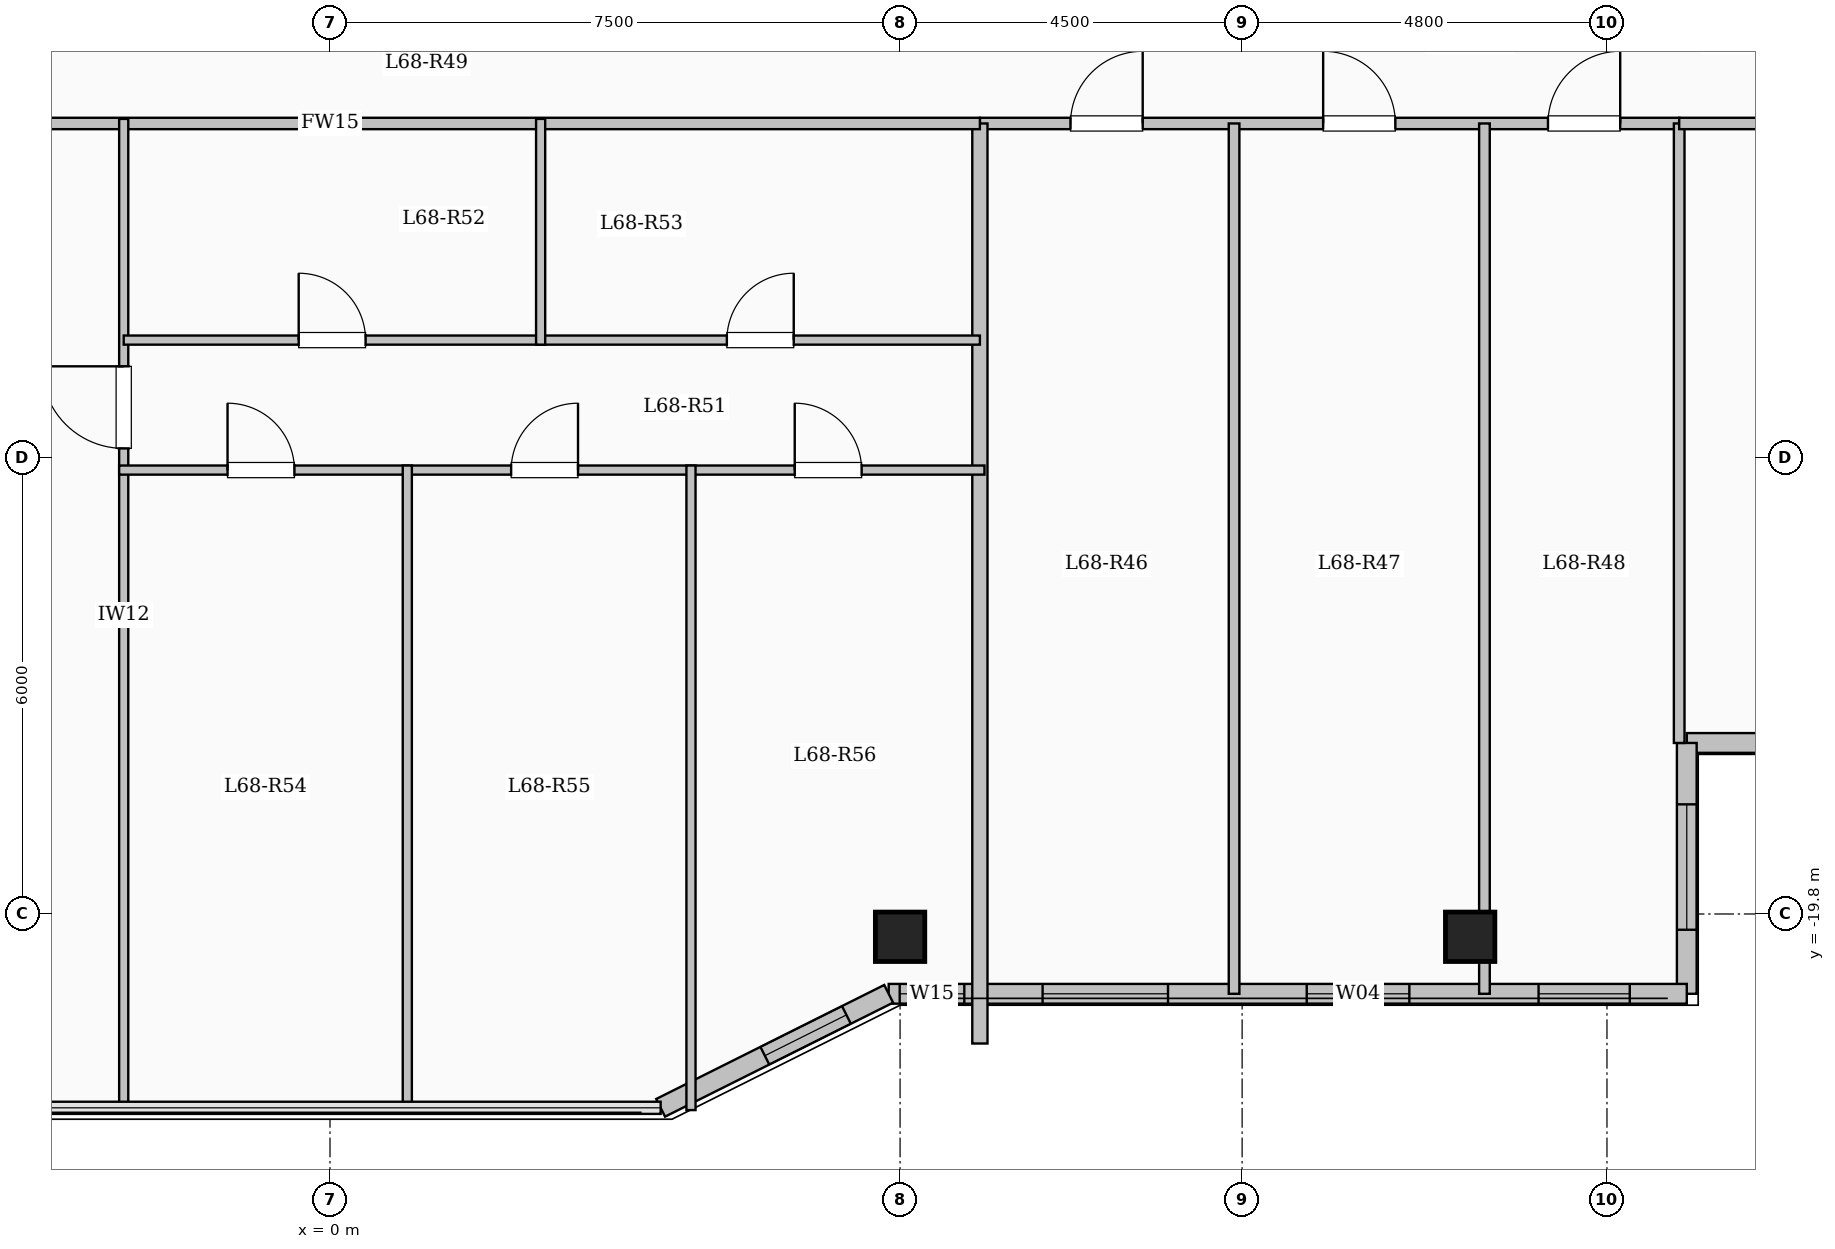
"""IFC4 building model, lengths in metres.
Left out: names, types, materials, properties, quantities, classifications, styles, units other than length and angle.
Written with IfcOpenShell. Run it as: python <this file> out.ifc"""

import sys

from ifc_helpers import new_model, si_unit, direction, frame, frame_2d, origin, origin_2d, place, context, subcontext, project, spatial, rectangle, extrude, element, fill, save


model = new_model("IFC4")
c1 = context("Model", 3, precision=1e-05, world=origin(), true_north=direction((0.0, 1.0)))
c2 = subcontext(c1, "Body", "Model", "MODEL_VIEW")
j1 = project(units=[si_unit("LENGTHUNIT", "METRE"), si_unit("PLANEANGLEUNIT", "RADIAN")], contexts=[c1])
p1 = place(None, origin())
s1 = spatial("IfcSite", under=j1, at=p1, CompositionType="ELEMENT")
p2 = place(p1, origin())
s2 = spatial("IfcBuilding", under=s1, at=p2, CompositionType="ELEMENT")
p3 = place(p2, frame((0.0, 0.0, 251.55)))
s3 = spatial("IfcBuildingStorey", under=s2, at=p3, CompositionType="ELEMENT", Elevation=251.55)
for number, where, z_axis, x_axis in (
    (1, (7.5, -20.1, 0.0), (0.0, 0.0, 1.0), (1.0, 0.0, 0.0)),
    (2, (15.0, -20.1, 0.0), (0.0, 0.0, 1.0), (1.0, 0.0, 0.0)),
):
    element("IfcColumn", number, at=place(p3, frame(where, z_axis=z_axis, x_axis=x_axis)), inside=s3, PredefinedType="COLUMN", context=c2, shape_type="SweptSolid", body=[
        extrude(rectangle(XDim=0.65, YDim=0.65, at=origin_2d()), origin(), (0.0, 0.0, 1.0), 3.35),
    ])
p4 = place(p3, frame((22.65, -17.55, 0.0), z_axis=(0.0, 0.0, 1.0), x_axis=(-1.0, 0.0, 0.0)))
e3 = element("IfcWall", 3, at=p4, inside=s3, PredefinedType="SOLIDWALL", context=c2, shape_type="SweptSolid", body=[
    extrude(rectangle(XDim=4.8, YDim=0.26, at=frame_2d((2.4, 0.0))), origin(), (0.0, 0.0, 1.0), 3.1),
])
p5 = place(p4, frame((1.325, 0.0, 0.9)))
e4 = element("IfcOpeningElement", 4, at=p5, cuts=e3, PredefinedType="OPENING", context=c2, shape_type="SweptSolid", body=[
    extrude(rectangle(XDim=2.2, YDim=1.75, at=frame_2d((1.1, 0.875))), frame((0.0, 0.14, 0.0), z_axis=(0.0, -1.0, 0.0), x_axis=(1.0, 0.0, 0.0)), (0.0, 0.0, 1.0), 0.28),
])
p6 = place(p3, frame((17.85, -17.55, 0.0), z_axis=(0.0, 0.0, 1.0), x_axis=(0.0, -1.0, 0.0)))
e5 = element("IfcWall", 5, at=p6, inside=s3, PredefinedType="SOLIDWALL", context=c2, shape_type="SweptSolid", body=[
    extrude(rectangle(XDim=3.3, YDim=0.26, at=frame_2d((1.65, 0.0))), origin(), (0.0, 0.0, 1.0), 3.1),
])
p7 = place(p6, frame((0.808, 0.0, 0.9)))
e6 = element("IfcOpeningElement", 6, at=p7, cuts=e5, PredefinedType="OPENING", context=c2, shape_type="SweptSolid", body=[
    extrude(rectangle(XDim=1.65, YDim=1.6, at=frame_2d((0.825, 0.8))), frame((0.0, 0.14, 0.0), z_axis=(0.0, -1.0, 0.0), x_axis=(1.0, 0.0, 0.0)), (0.0, 0.0, 1.0), 0.28),
])
p8 = place(p3, frame((17.85, -20.85, 0.0), z_axis=(0.0, 0.0, 1.0), x_axis=(-1.0, 0.0, 0.0)))
e7 = element("IfcWall", 7, at=p8, inside=s3, PredefinedType="SOLIDWALL", context=c2, shape_type="SweptSolid", body=[
    extrude(rectangle(XDim=10.5, YDim=0.26, at=frame_2d((5.25, 0.0))), origin(), (0.0, 0.0, 1.0), 3.1),
])
p9 = place(p8, frame((0.75, 0.0, 0.95)))
e8 = element("IfcOpeningElement", 8, at=p9, cuts=e7, PredefinedType="OPENING", context=c2, shape_type="SweptSolid", body=[
    extrude(rectangle(XDim=1.2, YDim=1.5, at=frame_2d((0.6, 0.75))), frame((0.0, 0.14, 0.0), z_axis=(0.0, -1.0, 0.0), x_axis=(1.0, 0.0, 0.0)), (0.0, 0.0, 1.0), 0.28),
])
p10 = place(p8, frame((3.65, 0.0, 0.95)))
e9 = element("IfcOpeningElement", 9, at=p10, cuts=e7, PredefinedType="OPENING", context=c2, shape_type="SweptSolid", body=[
    extrude(rectangle(XDim=1.35, YDim=1.55, at=frame_2d((0.675, 0.775))), frame((0.0, 0.14, 0.0), z_axis=(0.0, -1.0, 0.0), x_axis=(1.0, 0.0, 0.0)), (0.0, 0.0, 1.0), 0.28),
])
p11 = place(p8, frame((6.825, 0.0, 0.9)))
e10 = element("IfcOpeningElement", 10, at=p11, cuts=e7, PredefinedType="OPENING", context=c2, shape_type="SweptSolid", body=[
    extrude(rectangle(XDim=1.65, YDim=1.6, at=frame_2d((0.825, 0.8))), frame((0.0, 0.14, 0.0), z_axis=(0.0, -1.0, 0.0), x_axis=(1.0, 0.0, 0.0)), (0.0, 0.0, 1.0), 0.28),
])
p12 = place(p8, frame((9.505, 0.0, 0.95)))
e11 = element("IfcOpeningElement", 11, at=p12, cuts=e7, PredefinedType="OPENING", context=c2, shape_type="SweptSolid", body=[
    extrude(rectangle(XDim=0.85, YDim=1.5, at=frame_2d((0.425, 0.75))), frame((0.0, 0.14, 0.0), z_axis=(0.0, -1.0, 0.0), x_axis=(1.0, 0.0, 0.0)), (0.0, 0.0, 1.0), 0.28),
])
p13 = place(p3, frame((7.35, -20.85, 0.0), z_axis=(0.0, 0.0, 1.0), x_axis=(-0.894427191, -0.4472135955, 0.0)))
e12 = element("IfcWall", 12, at=p13, inside=s3, PredefinedType="SOLIDWALL", context=c2, shape_type="SweptSolid", body=[
    extrude(rectangle(XDim=3.354, YDim=0.26, at=frame_2d((1.677, 0.0))), origin(), (0.0, 0.0, 1.0), 3.1),
])
p14 = place(p13, frame((0.622, 0.0, 0.95)))
e13 = element("IfcOpeningElement", 13, at=p14, cuts=e12, PredefinedType="OPENING", context=c2, shape_type="SweptSolid", body=[
    extrude(rectangle(XDim=1.2, YDim=1.5, at=frame_2d((0.6, 0.75))), frame((0.0, 0.14, 0.0), z_axis=(0.0, -1.0, 0.0), x_axis=(1.0, 0.0, 0.0)), (0.0, 0.0, 1.0), 0.28),
])
p15 = place(p3, frame((8.55, -9.4, 0.0), z_axis=(0.0, 0.0, 1.0), x_axis=(1.0, 0.0, 0.0)))
e14 = element("IfcWall", 14, at=p15, inside=s3, PredefinedType="PARTITIONING", context=c2, shape_type="SweptSolid", body=[
    extrude(rectangle(XDim=9.2, YDim=0.15, at=frame_2d((4.6, 0.0))), origin(), (0.0, 0.0, 1.0), 3.1),
])
p16 = place(p15, frame((1.192, 0.0, 0.0)))
e15 = element("IfcOpeningElement", 15, at=p16, cuts=e14, PredefinedType="OPENING", context=c2, shape_type="SweptSolid", body=[
    extrude(rectangle(XDim=0.95, YDim=2.15, at=frame_2d((0.475, 1.075))), frame((0.0, 0.085, 0.0), z_axis=(0.0, -1.0, 0.0), x_axis=(1.0, 0.0, 0.0)), (0.0, 0.0, 1.0), 0.17),
])
p17 = place(p15, frame((4.516, 0.0, 0.0)))
e16 = element("IfcOpeningElement", 16, at=p17, cuts=e14, PredefinedType="OPENING", context=c2, shape_type="SweptSolid", body=[
    extrude(rectangle(XDim=0.95, YDim=2.15, at=frame_2d((0.475, 1.075))), frame((0.0, 0.085, 0.0), z_axis=(0.0, -1.0, 0.0), x_axis=(1.0, 0.0, 0.0)), (0.0, 0.0, 1.0), 0.17),
])
p18 = place(p15, frame((7.474, 0.0, 0.0)))
e17 = element("IfcOpeningElement", 17, at=p18, cuts=e14, PredefinedType="OPENING", context=c2, shape_type="SweptSolid", body=[
    extrude(rectangle(XDim=0.95, YDim=2.15, at=frame_2d((0.475, 1.075))), frame((0.0, 0.085, 0.0), z_axis=(0.0, -1.0, 0.0), x_axis=(1.0, 0.0, 0.0)), (0.0, 0.0, 1.0), 0.17),
])
p19 = place(p3, frame((11.894, -20.85, 0.0), z_axis=(0.0, 0.0, 1.0), x_axis=(0.0, 1.0, 0.0)))
e18 = element("IfcWall", 18, at=p19, inside=s3, PredefinedType="PARTITIONING", context=c2, shape_type="SweptSolid", body=[
    extrude(rectangle(XDim=11.45, YDim=0.14, at=frame_2d((5.725, 0.0))), origin(), (0.0, 0.0, 1.0), 3.1),
])
p20 = place(p3, frame((15.188, -20.85, 0.0), z_axis=(0.0, 0.0, 1.0), x_axis=(0.0, 1.0, 0.0)))
e19 = element("IfcWall", 19, at=p20, inside=s3, PredefinedType="PARTITIONING", context=c2, shape_type="SweptSolid", body=[
    extrude(rectangle(XDim=11.45, YDim=0.14, at=frame_2d((5.725, 0.0))), origin(), (0.0, 0.0, 1.0), 2.685),
])
p21 = place(p3, frame((8.55, -21.504, 0.0), z_axis=(0.0, 0.0, 1.0), x_axis=(0.0, 1.0, 0.0)))
e20 = element("IfcWall", 20, at=p21, inside=s3, PredefinedType="SOLIDWALL", context=c2, shape_type="SweptSolid", body=[
    extrude(rectangle(XDim=12.104, YDim=0.2, at=frame_2d((6.052, 0.0))), origin(), (0.0, 0.0, 1.0), 3.1),
])
p22 = place(p3, frame((-8.55, -9.4, 0.0), z_axis=(0.0, 0.0, 1.0), x_axis=(1.0, 0.0, 0.0)))
e21 = element("IfcWall", 21, at=p22, inside=s3, PredefinedType="PARTITIONING", context=c2, shape_type="SweptSolid", body=[
    extrude(rectangle(XDim=17.1, YDim=0.15, at=frame_2d((8.55, 0.0))), origin(), (0.0, 0.0, 1.0), 3.1),
])
p23 = place(p22, frame((1.75, 0.0, 0.0)))
e22 = element("IfcOpeningElement", 22, at=p23, cuts=e21, PredefinedType="OPENING", context=c2, shape_type="SweptSolid", body=[
    extrude(rectangle(XDim=0.96, YDim=2.15, at=frame_2d((0.48, 1.075))), frame((0.0, 0.085, 0.0), z_axis=(0.0, -1.0, 0.0), x_axis=(1.0, 0.0, 0.0)), (0.0, 0.0, 1.0), 0.17),
])
p24 = place(p3, frame((-2.714, -22.38, 0.0), z_axis=(0.0, 0.0, 1.0), x_axis=(0.0, 1.0, 0.0)))
e23 = element("IfcWall", 23, at=p24, inside=s3, PredefinedType="PARTITIONING", context=c2, shape_type="SweptSolid", body=[
    extrude(rectangle(XDim=13.04, YDim=0.12, at=frame_2d((6.52, 0.0))), origin(), (0.0, 0.0, 1.0), 3.1),
])
p25 = place(p24, frame((8.705, 0.0, 0.0)))
e24 = element("IfcOpeningElement", 24, at=p25, cuts=e23, PredefinedType="OPENING", context=c2, shape_type="SweptSolid", body=[
    extrude(rectangle(XDim=1.08, YDim=2.15, at=frame_2d((0.54, 1.075))), frame((0.0, 0.07, 0.0), z_axis=(0.0, -1.0, 0.0), x_axis=(1.0, 0.0, 0.0)), (0.0, 0.0, 1.0), 0.14),
])
p26 = place(p3, frame((-2.714, -12.25, 0.0), z_axis=(0.0, 0.0, 1.0), x_axis=(1.0, 0.0, 0.0)))
e25 = element("IfcWall", 25, at=p26, inside=s3, PredefinedType="PARTITIONING", context=c2, shape_type="SweptSolid", body=[
    extrude(rectangle(XDim=5.485, YDim=0.12, at=frame_2d((2.743, 0.0))), origin(), (0.0, 0.0, 1.0), 2.785),
])
p27 = place(p26, frame((2.302, 0.0, 0.0)))
e26 = element("IfcOpeningElement", 26, at=p27, cuts=e25, PredefinedType="OPENING", context=c2, shape_type="SweptSolid", body=[
    extrude(rectangle(XDim=0.88, YDim=2.1, at=frame_2d((0.44, 1.05))), frame((0.0, 0.07, 0.0), z_axis=(0.0, -1.0, 0.0), x_axis=(1.0, 0.0, 0.0)), (0.0, 0.0, 1.0), 0.14),
])
p28 = place(p3, frame((2.771, -12.25, 0.0), z_axis=(0.0, 0.0, 1.0), x_axis=(1.0, 0.0, 0.0)))
e27 = element("IfcWall", 27, at=p28, inside=s3, PredefinedType="PARTITIONING", context=c2, shape_type="SweptSolid", body=[
    extrude(rectangle(XDim=5.779, YDim=0.12, at=frame_2d((2.89, 0.0))), origin(), (0.0, 0.0, 1.0), 2.785),
])
p29 = place(p28, frame((2.45, 0.0, 0.0)))
e28 = element("IfcOpeningElement", 28, at=p29, cuts=e27, PredefinedType="OPENING", context=c2, shape_type="SweptSolid", body=[
    extrude(rectangle(XDim=0.88, YDim=2.1, at=frame_2d((0.44, 1.05))), frame((0.0, 0.07, 0.0), z_axis=(0.0, -1.0, 0.0), x_axis=(1.0, 0.0, 0.0)), (0.0, 0.0, 1.0), 0.14),
])
p30 = place(p3, frame((-2.774, -13.96, 0.0), z_axis=(0.0, 0.0, 1.0), x_axis=(1.0, 0.0, 0.0)))
e29 = element("IfcWall", 29, at=p30, inside=s3, PredefinedType="PARTITIONING", context=c2, shape_type="SweptSolid", body=[
    extrude(rectangle(XDim=11.384, YDim=0.12, at=frame_2d((5.692, 0.0))), origin(), (0.0, 0.0, 1.0), 2.785),
])
p31 = place(p30, frame((1.426, 0.0, 0.0)))
e30 = element("IfcOpeningElement", 30, at=p31, cuts=e29, PredefinedType="OPENING", context=c2, shape_type="SweptSolid", body=[
    extrude(rectangle(XDim=0.88, YDim=2.1, at=frame_2d((0.44, 1.05))), frame((0.0, 0.07, 0.0), z_axis=(0.0, -1.0, 0.0), x_axis=(1.0, 0.0, 0.0)), (0.0, 0.0, 1.0), 0.14),
])
p32 = place(p30, frame((5.157, 0.0, 0.0)))
e31 = element("IfcOpeningElement", 31, at=p32, cuts=e29, PredefinedType="OPENING", context=c2, shape_type="SweptSolid", body=[
    extrude(rectangle(XDim=0.88, YDim=2.1, at=frame_2d((0.44, 1.05))), frame((0.0, 0.07, 0.0), z_axis=(0.0, -1.0, 0.0), x_axis=(1.0, 0.0, 0.0)), (0.0, 0.0, 1.0), 0.14),
])
p33 = place(p30, frame((8.888, 0.0, 0.0)))
e32 = element("IfcOpeningElement", 32, at=p33, cuts=e29, PredefinedType="OPENING", context=c2, shape_type="SweptSolid", body=[
    extrude(rectangle(XDim=0.88, YDim=2.1, at=frame_2d((0.44, 1.05))), frame((0.0, 0.07, 0.0), z_axis=(0.0, -1.0, 0.0), x_axis=(1.0, 0.0, 0.0)), (0.0, 0.0, 1.0), 0.14),
])
p34 = place(p3, frame((2.771, -12.31, 0.0), z_axis=(0.0, 0.0, 1.0), x_axis=(0.0, 1.0, 0.0)))
e33 = element("IfcWall", 33, at=p34, inside=s3, PredefinedType="PARTITIONING", context=c2, shape_type="SweptSolid", body=[
    extrude(rectangle(XDim=2.97, YDim=0.12, at=frame_2d((1.485, 0.0))), origin(), (0.0, 0.0, 1.0), 3.1),
])
for number, where, z_axis, x_axis in (
    (34, (1.017, -22.38, 0.0), (0.0, 0.0, 1.0), (0.0, 1.0, 0.0)),
    (35, (4.749, -22.38, 0.0), (0.0, 0.0, 1.0), (0.0, 1.0, 0.0)),
):
    element("IfcWall", number, at=place(p3, frame(where, z_axis=z_axis, x_axis=x_axis)), inside=s3, PredefinedType="PARTITIONING", context=c2, shape_type="SweptSolid", body=[
        extrude(rectangle(XDim=8.48, YDim=0.12, at=frame_2d((4.24, 0.0))), origin(), (0.0, 0.0, 1.0), 3.1),
    ])
p35 = place(p3, frame((17.75, -17.55, 0.0), z_axis=(0.0, 0.0, 1.0), x_axis=(0.0, 1.0, 0.0)))
e36 = element("IfcWall", 36, at=p35, inside=s3, PredefinedType="PARTITIONING", context=c2, shape_type="SweptSolid", body=[
    extrude(rectangle(XDim=8.15, YDim=0.14, at=frame_2d((4.075, 0.0))), origin(), (0.0, 0.0, 1.0), 3.1),
])
p36 = place(p3, frame((17.75, -9.4, 0.0), z_axis=(0.0, 0.0, 1.0), x_axis=(1.0, 0.0, 0.0)))
e37 = element("IfcWall", 37, at=p36, inside=s3, PredefinedType="PARTITIONING", context=c2, shape_type="SweptSolid", body=[
    extrude(rectangle(XDim=4.93, YDim=0.15, at=frame_2d((2.465, 0.0))), origin(), (0.0, 0.0, 1.0), 3.1),
])
p37 = place(p36, frame((1.99, 0.0, 0.0)))
e38 = element("IfcOpeningElement", 38, at=p37, cuts=e37, PredefinedType="OPENING", context=c2, shape_type="SweptSolid", body=[
    extrude(rectangle(XDim=0.95, YDim=2.15, at=frame_2d((0.475, 1.075))), frame((0.0, 0.085, 0.0), z_axis=(0.0, -1.0, 0.0), x_axis=(1.0, 0.0, 0.0)), (0.0, 0.0, 1.0), 0.17),
])
p38 = place(p7, origin())
e39 = element("IfcWindow", 39, at=p38, inside=s3, PartitioningType="SINGLE_PANEL", PredefinedType="WINDOW", context=c2, shape_type="SweptSolid", body=[
    extrude(rectangle(XDim=1.65, YDim=1.6, at=frame_2d((0.825, 0.8))), frame((0.0, 0.03, 0.0), z_axis=(0.0, -1.0, 0.0), x_axis=(1.0, 0.0, 0.0)), (0.0, 0.0, 1.0), 0.06),
])
fill(e6, e39)
p39 = place(p9, origin())
e40 = element("IfcWindow", 40, at=p39, inside=s3, PartitioningType="SINGLE_PANEL", PredefinedType="WINDOW", context=c2, shape_type="SweptSolid", body=[
    extrude(rectangle(XDim=1.2, YDim=1.5, at=frame_2d((0.6, 0.75))), frame((0.0, 0.03, 0.0), z_axis=(0.0, -1.0, 0.0), x_axis=(1.0, 0.0, 0.0)), (0.0, 0.0, 1.0), 0.06),
])
fill(e8, e40)
p40 = place(p10, origin())
e41 = element("IfcWindow", 41, at=p40, inside=s3, PartitioningType="SINGLE_PANEL", PredefinedType="WINDOW", context=c2, shape_type="SweptSolid", body=[
    extrude(rectangle(XDim=1.35, YDim=1.55, at=frame_2d((0.675, 0.775))), frame((0.0, 0.03, 0.0), z_axis=(0.0, -1.0, 0.0), x_axis=(1.0, 0.0, 0.0)), (0.0, 0.0, 1.0), 0.06),
])
fill(e9, e41)
p41 = place(p11, origin())
e42 = element("IfcWindow", 42, at=p41, inside=s3, PartitioningType="SINGLE_PANEL", PredefinedType="WINDOW", context=c2, shape_type="SweptSolid", body=[
    extrude(rectangle(XDim=1.65, YDim=1.6, at=frame_2d((0.825, 0.8))), frame((0.0, 0.03, 0.0), z_axis=(0.0, -1.0, 0.0), x_axis=(1.0, 0.0, 0.0)), (0.0, 0.0, 1.0), 0.06),
])
fill(e10, e42)
p42 = place(p12, origin())
e43 = element("IfcWindow", 43, at=p42, inside=s3, PartitioningType="SINGLE_PANEL", PredefinedType="WINDOW", context=c2, shape_type="SweptSolid", body=[
    extrude(rectangle(XDim=0.85, YDim=1.5, at=frame_2d((0.425, 0.75))), frame((0.0, 0.03, 0.0), z_axis=(0.0, -1.0, 0.0), x_axis=(1.0, 0.0, 0.0)), (0.0, 0.0, 1.0), 0.06),
])
fill(e11, e43)
p43 = place(p14, origin())
e44 = element("IfcWindow", 44, at=p43, inside=s3, PartitioningType="SINGLE_PANEL", PredefinedType="WINDOW", context=c2, shape_type="SweptSolid", body=[
    extrude(rectangle(XDim=1.2, YDim=1.5, at=frame_2d((0.6, 0.75))), frame((0.0, 0.03, 0.0), z_axis=(0.0, -1.0, 0.0), x_axis=(1.0, 0.0, 0.0)), (0.0, 0.0, 1.0), 0.06),
])
fill(e13, e44)
p44 = place(p16, origin())
e45 = element("IfcDoor", 45, at=p44, inside=s3, OperationType="SINGLE_SWING_RIGHT", PredefinedType="DOOR", context=c2, shape_type="SweptSolid", body=[
    extrude(rectangle(XDim=0.95, YDim=2.15, at=frame_2d((0.475, 1.075))), frame((0.0, 0.025, 0.0), z_axis=(0.0, -1.0, 0.0), x_axis=(1.0, 0.0, 0.0)), (0.0, 0.0, 1.0), 0.05),
])
fill(e15, e45)
p45 = place(p17, origin())
e46 = element("IfcDoor", 46, at=p45, inside=s3, OperationType="SINGLE_SWING_LEFT", PredefinedType="DOOR", context=c2, shape_type="SweptSolid", body=[
    extrude(rectangle(XDim=0.95, YDim=2.15, at=frame_2d((0.475, 1.075))), frame((0.0, 0.025, 0.0), z_axis=(0.0, -1.0, 0.0), x_axis=(1.0, 0.0, 0.0)), (0.0, 0.0, 1.0), 0.05),
])
fill(e16, e46)
p46 = place(p18, origin())
e47 = element("IfcDoor", 47, at=p46, inside=s3, OperationType="SINGLE_SWING_RIGHT", PredefinedType="DOOR", context=c2, shape_type="SweptSolid", body=[
    extrude(rectangle(XDim=0.95, YDim=2.15, at=frame_2d((0.475, 1.075))), frame((0.0, 0.025, 0.0), z_axis=(0.0, -1.0, 0.0), x_axis=(1.0, 0.0, 0.0)), (0.0, 0.0, 1.0), 0.05),
])
fill(e17, e47)
p47 = place(p25, origin())
e48 = element("IfcDoor", 48, at=p47, inside=s3, OperationType="SINGLE_SWING_RIGHT", PredefinedType="DOOR", context=c2, shape_type="SweptSolid", body=[
    extrude(rectangle(XDim=1.08, YDim=2.15, at=frame_2d((0.54, 1.075))), frame((0.0, 0.025, 0.0), z_axis=(0.0, -1.0, 0.0), x_axis=(1.0, 0.0, 0.0)), (0.0, 0.0, 1.0), 0.05),
])
fill(e24, e48)
p48 = place(p27, origin())
e49 = element("IfcDoor", 49, at=p48, inside=s3, OperationType="SINGLE_SWING_LEFT", PredefinedType="DOOR", context=c2, shape_type="SweptSolid", body=[
    extrude(rectangle(XDim=0.88, YDim=2.1, at=frame_2d((0.44, 1.05))), frame((0.0, 0.025, 0.0), z_axis=(0.0, -1.0, 0.0), x_axis=(1.0, 0.0, 0.0)), (0.0, 0.0, 1.0), 0.05),
])
fill(e26, e49)
p49 = place(p29, origin())
e50 = element("IfcDoor", 50, at=p49, inside=s3, OperationType="SINGLE_SWING_RIGHT", PredefinedType="DOOR", context=c2, shape_type="SweptSolid", body=[
    extrude(rectangle(XDim=0.88, YDim=2.1, at=frame_2d((0.44, 1.05))), frame((0.0, 0.025, 0.0), z_axis=(0.0, -1.0, 0.0), x_axis=(1.0, 0.0, 0.0)), (0.0, 0.0, 1.0), 0.05),
])
fill(e28, e50)
p50 = place(p31, origin())
e51 = element("IfcDoor", 51, at=p50, inside=s3, OperationType="SINGLE_SWING_LEFT", PredefinedType="DOOR", context=c2, shape_type="SweptSolid", body=[
    extrude(rectangle(XDim=0.88, YDim=2.1, at=frame_2d((0.44, 1.05))), frame((0.0, 0.025, 0.0), z_axis=(0.0, -1.0, 0.0), x_axis=(1.0, 0.0, 0.0)), (0.0, 0.0, 1.0), 0.05),
])
fill(e30, e51)
p51 = place(p32, origin())
e52 = element("IfcDoor", 52, at=p51, inside=s3, OperationType="SINGLE_SWING_RIGHT", PredefinedType="DOOR", context=c2, shape_type="SweptSolid", body=[
    extrude(rectangle(XDim=0.88, YDim=2.1, at=frame_2d((0.44, 1.05))), frame((0.0, 0.025, 0.0), z_axis=(0.0, -1.0, 0.0), x_axis=(1.0, 0.0, 0.0)), (0.0, 0.0, 1.0), 0.05),
])
fill(e31, e52)
p52 = place(p33, origin())
e53 = element("IfcDoor", 53, at=p52, inside=s3, OperationType="SINGLE_SWING_LEFT", PredefinedType="DOOR", context=c2, shape_type="SweptSolid", body=[
    extrude(rectangle(XDim=0.88, YDim=2.1, at=frame_2d((0.44, 1.05))), frame((0.0, 0.025, 0.0), z_axis=(0.0, -1.0, 0.0), x_axis=(1.0, 0.0, 0.0)), (0.0, 0.0, 1.0), 0.05),
])
fill(e32, e53)
save(model, sys.argv[1])
